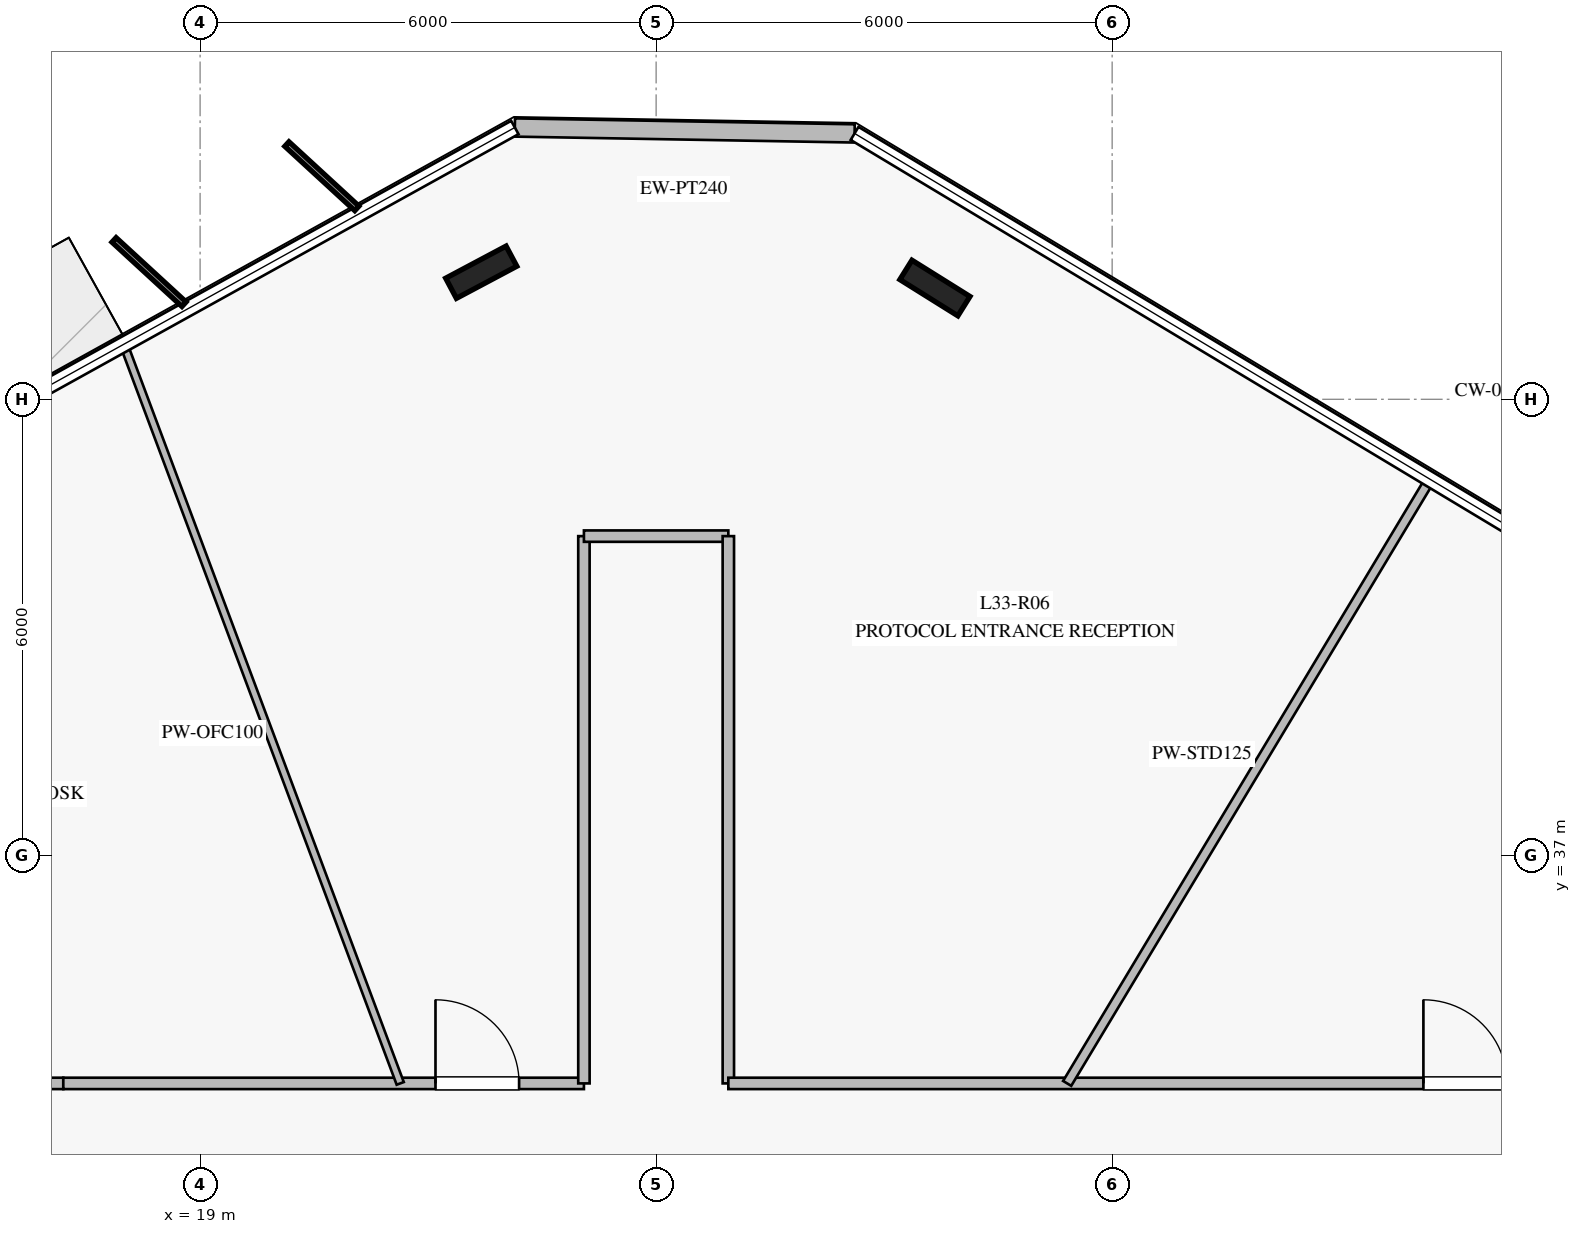
"""IFC4 building model, lengths in metres.
Left out: names, types, materials, properties, quantities, classifications, styles, units other than length and angle.
Written with IfcOpenShell. Run it as: python <this file> out.ifc"""

import sys

from ifc_helpers import new_model, si_unit, direction, frame, frame_2d, origin, origin_2d, place, context, subcontext, project, spatial, rectangle, i_section, extrude, element, fill, save


model = new_model("IFC4")
c1 = context("Model", 3, precision=1e-05, world=origin(), true_north=direction((0.0, 1.0)))
c2 = subcontext(c1, "Body", "Model", "MODEL_VIEW")
j1 = project(units=[si_unit("LENGTHUNIT", "METRE"), si_unit("PLANEANGLEUNIT", "RADIAN")], contexts=[c1])
p1 = place(None, origin())
s1 = spatial("IfcSite", under=j1, at=p1, CompositionType="ELEMENT")
p2 = place(p1, origin())
s2 = spatial("IfcBuilding", under=s1, at=p2, CompositionType="ELEMENT")
p3 = place(p2, frame((0.0, 0.0, 138.4)))
s3 = spatial("IfcBuildingStorey", under=s2, at=p3, CompositionType="ELEMENT", Elevation=138.4)
for number, where, z_axis, x_axis in (
    (1, (28.668, 44.464, 0.0), (0.0, 0.0, 1.0), (-0.848, 0.53, 0.0)),
    (2, (22.699, 44.672, 0.0), (0.0, 0.0, 1.0), (0.883, 0.469, 0.0)),
):
    element("IfcColumn", number, at=place(p3, frame(where, z_axis=z_axis, x_axis=x_axis)), inside=s3, PredefinedType="COLUMN", context=c2, shape_type="SweptSolid", body=[
        extrude(i_section(OverallWidth=0.3, OverallDepth=0.9, WebThickness=0.019, FlangeThickness=0.035, at=origin_2d()), origin(), (0.0, 0.0, 1.0), 4.0),
    ])
p4 = place(p3, frame((27.611, 46.498, 0.0), z_axis=(0.0, 0.0, 1.0), x_axis=(-0.999848251902, 0.017420481313, 0.0)))
e3 = element("IfcWall", 3, at=p4, inside=s3, PredefinedType="STANDARD", context=c2, shape_type="SweptSolid", body=[
    extrude(rectangle(XDim=4.471, YDim=0.24, at=frame_2d((2.235, 0.0))), origin(), (0.0, 0.0, 1.0), 3.76),
])
p5 = place(p3, frame((15.4, 34.0, 0.0), z_axis=(0.0, 0.0, 1.0), x_axis=(1.0, 0.0, 0.0)))
e4 = element("IfcWall", 4, at=p5, inside=s3, PredefinedType="PARTITIONING", context=c2, shape_type="SweptSolid", body=[
    extrude(rectangle(XDim=1.8, YDim=0.15, at=frame_2d((0.9, 0.0))), origin(), (0.0, 0.0, 1.0), 3.76),
])
p6 = place(p3, frame((17.2, 34.0, 0.0), z_axis=(0.0, 0.0, 1.0), x_axis=(1.0, 0.0, 0.0)))
e5 = element("IfcWall", 5, at=p6, inside=s3, PredefinedType="PARTITIONING", context=c2, shape_type="SweptSolid", body=[
    extrude(rectangle(XDim=6.85, YDim=0.15, at=frame_2d((3.425, 0.0))), origin(), (0.0, 0.0, 1.0), 3.21),
])
p7 = place(p6, frame((4.897, 0.0, 0.0)))
e6 = element("IfcOpeningElement", 6, at=p7, cuts=e5, PredefinedType="OPENING", context=c2, shape_type="SweptSolid", body=[
    extrude(rectangle(XDim=1.1, YDim=2.2, at=frame_2d((0.55, 1.1))), frame((0.0, 0.085, 0.0), z_axis=(0.0, -1.0, 0.0), x_axis=(1.0, 0.0, 0.0)), (0.0, 0.0, 1.0), 0.17),
])
p8 = place(p3, frame((24.05, 34.0, 0.0), z_axis=(0.0, 0.0, 1.0), x_axis=(0.0, 1.0, 0.0)))
e7 = element("IfcWall", 7, at=p8, inside=s3, PredefinedType="PARTITIONING", context=c2, shape_type="SweptSolid", body=[
    extrude(rectangle(XDim=7.2, YDim=0.15, at=frame_2d((3.6, 0.0))), origin(), (0.0, 0.0, 1.0), 3.36),
])
p9 = place(p3, frame((24.05, 41.2, 0.0), z_axis=(0.0, 0.0, 1.0), x_axis=(1.0, 0.0, 0.0)))
e8 = element("IfcWall", 8, at=p9, inside=s3, PredefinedType="PARTITIONING", context=c2, shape_type="SweptSolid", body=[
    extrude(rectangle(XDim=1.9, YDim=0.15, at=frame_2d((0.95, 0.0))), origin(), (0.0, 0.0, 1.0), 3.76),
])
p10 = place(p3, frame((25.95, 41.2, 0.0), z_axis=(0.0, 0.0, 1.0), x_axis=(0.0, -1.0, 0.0)))
e9 = element("IfcWall", 9, at=p10, inside=s3, PredefinedType="PARTITIONING", context=c2, shape_type="SweptSolid", body=[
    extrude(rectangle(XDim=7.2, YDim=0.15, at=frame_2d((3.6, 0.0))), origin(), (0.0, 0.0, 1.0), 3.36),
])
p11 = place(p3, frame((25.95, 34.0, 0.0), z_axis=(0.0, 0.0, 1.0), x_axis=(1.0, 0.0, 0.0)))
e10 = element("IfcWall", 10, at=p11, inside=s3, PredefinedType="PARTITIONING", context=c2, shape_type="SweptSolid", body=[
    extrude(rectangle(XDim=15.25, YDim=0.15, at=frame_2d((7.625, 0.0))), origin(), (0.0, 0.0, 1.0), 3.21),
])
p12 = place(p11, frame((9.145, 0.0, 0.0)))
e11 = element("IfcOpeningElement", 11, at=p12, cuts=e10, PredefinedType="OPENING", context=c2, shape_type="SweptSolid", body=[
    extrude(rectangle(XDim=1.1, YDim=2.2, at=frame_2d((0.55, 1.1))), frame((0.0, 0.085, 0.0), z_axis=(0.0, -1.0, 0.0), x_axis=(1.0, 0.0, 0.0)), (0.0, 0.0, 1.0), 0.17),
])
p13 = place(p3, frame((30.408, 34.0, 0.0), z_axis=(0.0, 0.0, 1.0), x_axis=(0.514992235675, 0.857194842025, 0.0)))
e12 = element("IfcWall", 12, at=p13, inside=s3, PredefinedType="PARTITIONING", context=c2, shape_type="SweptSolid", body=[
    extrude(rectangle(XDim=9.255, YDim=0.125, at=frame_2d((4.627, 0.0))), origin(), (0.0, 0.0, 1.0), 3.05),
])
p14 = place(p3, frame((21.633, 34.0, 0.0), z_axis=(0.0, 0.0, 1.0), x_axis=(-0.350441839508, 0.936584495453, 0.0)))
e13 = element("IfcWall", 13, at=p14, inside=s3, PredefinedType="MOVABLE", context=c2, shape_type="SweptSolid", body=[
    extrude(rectangle(XDim=10.364, YDim=0.1, at=frame_2d((5.182, 0.0))), origin(), (0.0, 0.0, 1.0), 3.16),
])
p15 = place(p12, origin())
e14 = element("IfcDoor", 14, at=p15, inside=s3, OperationType="SINGLE_SWING_LEFT", PredefinedType="DOOR", context=c2, shape_type="SweptSolid", body=[
    extrude(rectangle(XDim=1.1, YDim=2.2, at=frame_2d((0.55, 1.1))), frame((0.0, 0.025, 0.0), z_axis=(0.0, -1.0, 0.0), x_axis=(1.0, 0.0, 0.0)), (0.0, 0.0, 1.0), 0.05),
])
fill(e11, e14)
p16 = place(p7, origin())
e15 = element("IfcDoor", 15, at=p16, inside=s3, OperationType="SINGLE_SWING_LEFT", PredefinedType="DOOR", context=c2, shape_type="SweptSolid", body=[
    extrude(rectangle(XDim=1.1, YDim=2.2, at=frame_2d((0.55, 1.1))), frame((0.0, 0.025, 0.0), z_axis=(0.0, -1.0, 0.0), x_axis=(1.0, 0.0, 0.0)), (0.0, 0.0, 1.0), 0.05),
])
fill(e6, e15)
save(model, sys.argv[1])
